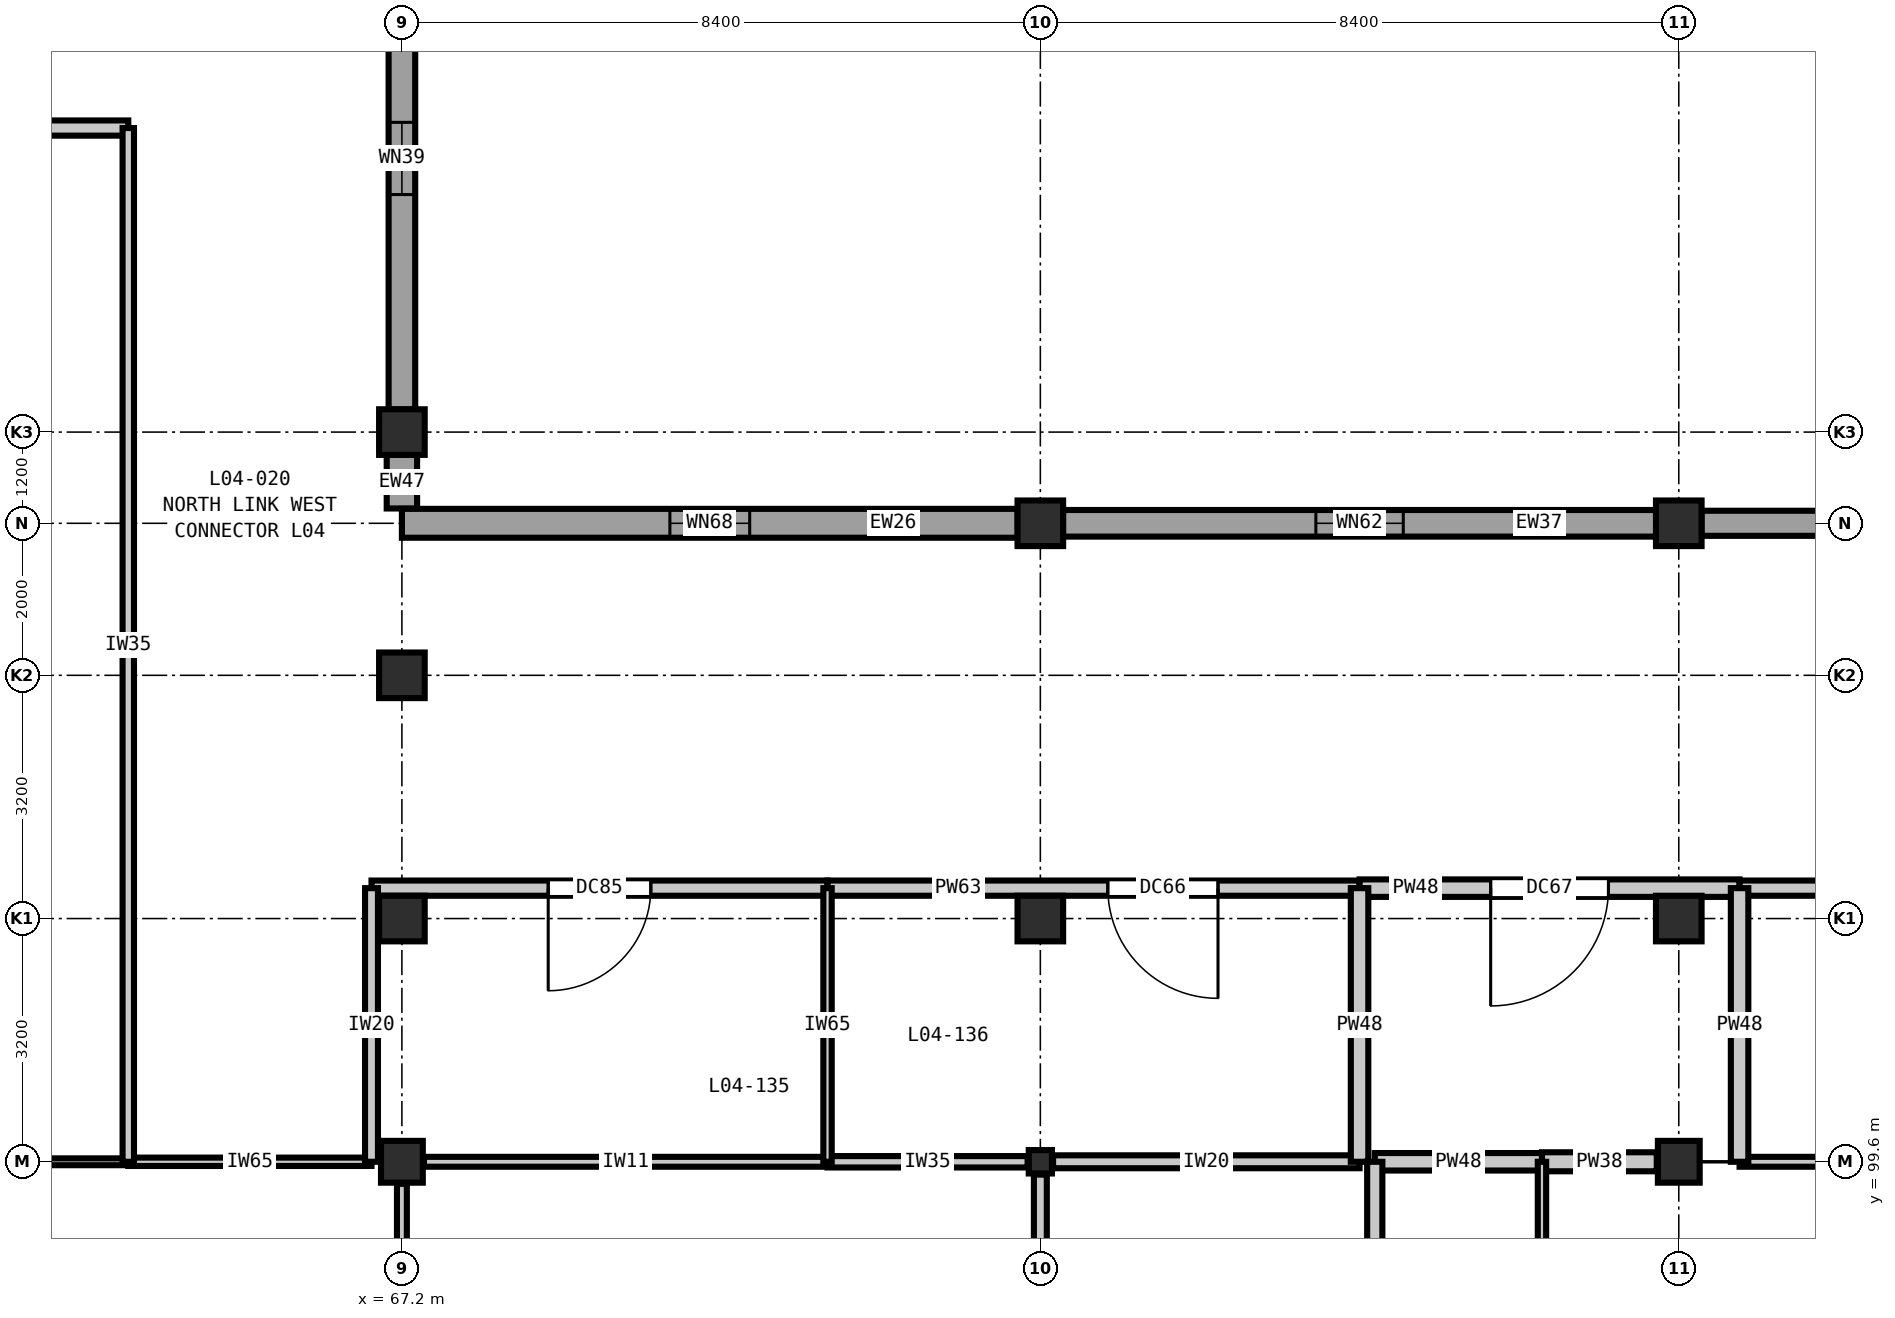
"""IFC4 building model, lengths in metres.
Left out: names, types, materials, properties, quantities, classifications, styles, units other than length and angle.
Written with IfcOpenShell. Run it as: python <this file> out.ifc"""

import sys

from ifc_helpers import new_model, si_unit, direction, frame, frame_2d, origin, origin_2d, place, context, subcontext, project, spatial, rectangle, i_section, extrude, element, fill, save


model = new_model("IFC4")
c1 = context("Model", 3, precision=1e-05, world=origin(), true_north=direction((0.0, 1.0)))
c2 = subcontext(c1, "Body", "Model", "MODEL_VIEW")
j1 = project(units=[si_unit("LENGTHUNIT", "METRE"), si_unit("PLANEANGLEUNIT", "RADIAN")], contexts=[c1])
p1 = place(None, origin())
s1 = spatial("IfcSite", under=j1, at=p1, CompositionType="ELEMENT")
p2 = place(p1, origin())
s2 = spatial("IfcBuilding", under=s1, at=p2, CompositionType="ELEMENT")
p3 = place(p2, frame((0.0, 0.0, 20.4)))
s3 = spatial("IfcBuildingStorey", under=s2, at=p3, CompositionType="ELEMENT", Elevation=20.4)
p4 = place(p3, frame((67.2, 99.6, 0.0), z_axis=(0.0, 0.0, 1.0), x_axis=(1.0, 0.0, 0.0)))
e1 = element("IfcColumn", 1, at=p4, inside=s3, PredefinedType="COLUMN", context=c2, shape_type="SweptSolid", body=[
    extrude(rectangle(XDim=0.55, YDim=0.55, at=origin_2d()), origin(), (0.0, 0.0, 1.0), 4.2),
])
for number, where, z_axis, x_axis in (
    (2, (67.2, 102.8, 0.0), (0.0, 0.0, 1.0), (1.0, 0.0, 0.0)),
    (3, (67.2, 106.0, 0.0), (0.0, 0.0, 1.0), (1.0, 0.0, 0.0)),
    (4, (67.2, 109.2, 0.0), (0.0, 0.0, 1.0), (1.0, 0.0, 0.0)),
):
    element("IfcColumn", number, at=place(p3, frame(where, z_axis=z_axis, x_axis=x_axis)), inside=s3, PredefinedType="COLUMN", context=c2, shape_type="SweptSolid", body=[
        extrude(rectangle(XDim=0.6, YDim=0.6, at=origin_2d()), origin(), (0.0, 0.0, 1.0), 4.2),
    ])
p5 = place(p3, frame((75.6, 99.6, 0.0), z_axis=(0.0, 0.0, 1.0), x_axis=(1.0, 0.0, 0.0)))
e5 = element("IfcColumn", 5, at=p5, inside=s3, PredefinedType="COLUMN", context=c2, shape_type="SweptSolid", body=[
    extrude(i_section(OverallWidth=0.305, OverallDepth=0.308, WebThickness=0.01, FlangeThickness=0.015, FilletRadius=0.015, at=origin_2d()), origin(), (0.0, 0.0, 1.0), 4.2),
])
for number, where, z_axis, x_axis in (
    (6, (75.6, 102.8, 0.0), (0.0, 0.0, 1.0), (1.0, 0.0, 0.0)),
    (7, (75.6, 108.0, 0.0), (0.0, 0.0, 1.0), (1.0, 0.0, 0.0)),
):
    element("IfcColumn", number, at=place(p3, frame(where, z_axis=z_axis, x_axis=x_axis)), inside=s3, PredefinedType="COLUMN", context=c2, shape_type="SweptSolid", body=[
        extrude(rectangle(XDim=0.6, YDim=0.6, at=origin_2d()), origin(), (0.0, 0.0, 1.0), 4.2),
    ])
p6 = place(p3, frame((84.0, 99.6, 0.0), z_axis=(0.0, 0.0, 1.0), x_axis=(1.0, 0.0, 0.0)))
e8 = element("IfcColumn", 8, at=p6, inside=s3, PredefinedType="COLUMN", context=c2, shape_type="SweptSolid", body=[
    extrude(rectangle(XDim=0.55, YDim=0.55, at=origin_2d()), origin(), (0.0, 0.0, 1.0), 4.2),
])
for number, where, z_axis, x_axis in (
    (9, (84.0, 102.8, 0.0), (0.0, 0.0, 1.0), (1.0, 0.0, 0.0)),
    (10, (84.0, 108.0, 0.0), (0.0, 0.0, 1.0), (1.0, 0.0, 0.0)),
):
    element("IfcColumn", number, at=place(p3, frame(where, z_axis=z_axis, x_axis=x_axis)), inside=s3, PredefinedType="COLUMN", context=c2, shape_type="SweptSolid", body=[
        extrude(rectangle(XDim=0.6, YDim=0.6, at=origin_2d()), origin(), (0.0, 0.0, 1.0), 4.2),
    ])
p7 = place(p3, frame((67.2, 116.102, 0.0), z_axis=(0.0, 0.0, 1.0), x_axis=(0.0, -1.0, 0.0)))
e11 = element("IfcWall", 11, at=p7, inside=s3, PredefinedType="SOLIDWALL", context=c2, shape_type="SweptSolid", body=[
    extrude(rectangle(XDim=6.604, YDim=0.35, at=frame_2d((3.302, 0.0))), origin(), (0.0, 0.0, 1.0), 3.48),
])
p8 = place(p7, frame((2.827, 0.0, 0.9)))
e12 = element("IfcOpeningElement", 12, at=p8, cuts=e11, PredefinedType="OPENING", context=c2, shape_type="SweptSolid", body=[
    extrude(rectangle(XDim=0.95, YDim=1.4, at=frame_2d((0.475, 0.7))), frame((0.0, 0.185, 0.0), z_axis=(0.0, -1.0, 0.0), x_axis=(1.0, 0.0, 0.0)), (0.0, 0.0, 1.0), 0.37),
])
p9 = place(p3, frame((67.2, 108.902, 0.0), z_axis=(0.0, 0.0, 1.0), x_axis=(0.0, -1.0, 0.0)))
e13 = element("IfcWall", 13, at=p9, inside=s3, PredefinedType="SOLIDWALL", context=c2, shape_type="SweptSolid", body=[
    extrude(rectangle(XDim=0.707, YDim=0.4, at=frame_2d((0.354, 0.0))), origin(), (0.0, 0.0, 1.0), 3.48),
])
p10 = place(p3, frame((67.2, 108.0, 0.0), z_axis=(0.0, 0.0, 1.0), x_axis=(1.0, 0.0, 0.0)))
e14 = element("IfcWall", 14, at=p10, inside=s3, PredefinedType="SOLIDWALL", context=c2, shape_type="SweptSolid", body=[
    extrude(rectangle(XDim=8.102, YDim=0.38, at=frame_2d((4.051, 0.0))), origin(), (0.0, 0.0, 1.0), 3.48),
])
p11 = place(p10, frame((3.526, 0.0, 0.9)))
e15 = element("IfcOpeningElement", 15, at=p11, cuts=e14, PredefinedType="OPENING", context=c2, shape_type="SweptSolid", body=[
    extrude(rectangle(XDim=1.05, YDim=1.4, at=frame_2d((0.525, 0.7))), frame((0.0, 0.2, 0.0), z_axis=(0.0, -1.0, 0.0), x_axis=(1.0, 0.0, 0.0)), (0.0, 0.0, 1.0), 0.4),
])
p12 = place(p3, frame((75.898, 108.0, 0.0), z_axis=(0.0, 0.0, 1.0), x_axis=(1.0, 0.0, 0.0)))
e16 = element("IfcWall", 16, at=p12, inside=s3, PredefinedType="SOLIDWALL", context=c2, shape_type="SweptSolid", body=[
    extrude(rectangle(XDim=7.804, YDim=0.35, at=frame_2d((3.902, 0.0))), origin(), (0.0, 0.0, 1.0), 3.48),
])
p13 = place(p12, frame((3.327, 0.0, 0.9)))
e17 = element("IfcOpeningElement", 17, at=p13, cuts=e16, PredefinedType="OPENING", context=c2, shape_type="SweptSolid", body=[
    extrude(rectangle(XDim=1.15, YDim=1.4, at=frame_2d((0.575, 0.7))), frame((0.0, 0.185, 0.0), z_axis=(0.0, -1.0, 0.0), x_axis=(1.0, 0.0, 0.0)), (0.0, 0.0, 1.0), 0.37),
])
p14 = place(p3, frame((84.298, 108.0, 0.0), z_axis=(0.0, 0.0, 1.0), x_axis=(1.0, 0.0, 0.0)))
e18 = element("IfcWall", 18, at=p14, inside=s3, PredefinedType="SOLIDWALL", context=c2, shape_type="SweptSolid", body=[
    extrude(rectangle(XDim=7.804, YDim=0.33, at=frame_2d((3.902, 0.0))), origin(), (0.0, 0.0, 1.0), 3.48),
])
p15 = place(p14, frame((3.277, 0.0, 0.9)))
e19 = element("IfcOpeningElement", 19, at=p15, cuts=e18, PredefinedType="OPENING", context=c2, shape_type="SweptSolid", body=[
    extrude(rectangle(XDim=1.25, YDim=1.4, at=frame_2d((0.625, 0.7))), frame((0.0, 0.175, 0.0), z_axis=(0.0, -1.0, 0.0), x_axis=(1.0, 0.0, 0.0)), (0.0, 0.0, 1.0), 0.35),
])
p16 = place(p3, frame((59.09, 99.6, 0.0), z_axis=(0.0, 0.0, 1.0), x_axis=(1.0, 0.0, 0.0)))
e20 = element("IfcWall", 20, at=p16, inside=s3, PredefinedType="PARTITIONING", context=c2, shape_type="SweptSolid", body=[
    extrude(rectangle(XDim=4.51, YDim=0.09, at=frame_2d((2.255, 0.0))), origin(), (0.0, 0.0, 1.0), 3.585),
])
p17 = place(p3, frame((63.6, 99.6, 0.0), z_axis=(0.0, 0.0, 1.0), x_axis=(1.0, 0.0, 0.0)))
e21 = element("IfcWall", 21, at=p17, inside=s3, PredefinedType="PARTITIONING", context=c2, shape_type="SweptSolid", body=[
    extrude(rectangle(XDim=3.2, YDim=0.11, at=frame_2d((1.6, 0.0))), origin(), (0.0, 0.0, 1.0), 3.585),
])
p18 = place(p3, frame((67.49, 99.6, 0.0), z_axis=(0.0, 0.0, 1.0), x_axis=(1.0, 0.0, 0.0)))
e22 = element("IfcWall", 22, at=p18, inside=s3, PredefinedType="PARTITIONING", context=c2, shape_type="SweptSolid", body=[
    extrude(rectangle(XDim=5.31, YDim=0.13, at=frame_2d((2.655, 0.0))), origin(), (0.0, 0.0, 1.0), 3.585),
])
p19 = place(p3, frame((72.8, 99.6, 0.0), z_axis=(0.0, 0.0, 1.0), x_axis=(1.0, 0.0, 0.0)))
e23 = element("IfcWall", 23, at=p19, inside=s3, PredefinedType="PARTITIONING", context=c2, shape_type="SweptSolid", body=[
    extrude(rectangle(XDim=2.633, YDim=0.15, at=frame_2d((1.316, 0.0))), origin(), (0.0, 0.0, 1.0), 3.585),
])
p20 = place(p3, frame((75.768, 99.6, 0.0), z_axis=(0.0, 0.0, 1.0), x_axis=(1.0, 0.0, 0.0)))
e24 = element("IfcWall", 24, at=p20, inside=s3, PredefinedType="PARTITIONING", context=c2, shape_type="SweptSolid", body=[
    extrude(rectangle(XDim=4.032, YDim=0.17, at=frame_2d((2.016, 0.0))), origin(), (0.0, 0.0, 1.0), 3.585),
])
p21 = place(p3, frame((80.0, 99.6, 0.0), z_axis=(0.0, 0.0, 1.0), x_axis=(1.0, 0.0, 0.0)))
e25 = element("IfcWall", 25, at=p21, inside=s3, PredefinedType="PARTITIONING", context=c2, shape_type="SweptSolid", body=[
    extrude(rectangle(XDim=2.2, YDim=0.23, at=frame_2d((1.1, 0.0))), origin(), (0.0, 0.0, 1.0), 3.585),
])
p22 = place(p3, frame((82.2, 99.6, 0.0), z_axis=(0.0, 0.0, 1.0), x_axis=(1.0, 0.0, 0.0)))
e26 = element("IfcWall", 26, at=p22, inside=s3, PredefinedType="PARTITIONING", context=c2, shape_type="SweptSolid", body=[
    extrude(rectangle(XDim=1.51, YDim=0.25, at=frame_2d((0.755, 0.0))), origin(), (0.0, 0.0, 1.0), 3.585),
])
p23 = place(p3, frame((84.8, 99.6, 0.0), z_axis=(0.0, 0.0, 1.0), x_axis=(1.0, 0.0, 0.0)))
e27 = element("IfcWall", 27, at=p23, inside=s3, PredefinedType="PARTITIONING", context=c2, shape_type="SweptSolid", body=[
    extrude(rectangle(XDim=5.8, YDim=0.13, at=frame_2d((2.9, 0.0))), origin(), (0.0, 0.0, 1.0), 3.585),
])
p24 = place(p3, frame((66.8, 103.2, 0.0), z_axis=(0.0, 0.0, 1.0), x_axis=(1.0, 0.0, 0.0)))
e28 = element("IfcWall", 28, at=p24, inside=s3, PredefinedType="PARTITIONING", context=c2, shape_type="SweptSolid", body=[
    extrude(rectangle(XDim=6.0, YDim=0.2, at=frame_2d((3.0, 0.0))), origin(), (0.0, 0.0, 1.0), 3.82),
])
p25 = place(p24, frame((2.325, 0.0, 0.0)))
e29 = element("IfcOpeningElement", 29, at=p25, cuts=e28, PredefinedType="OPENING", context=c2, shape_type="SweptSolid", body=[
    extrude(rectangle(XDim=1.35, YDim=2.2, at=frame_2d((0.675, 1.1))), frame((0.0, 0.11, 0.0), z_axis=(0.0, -1.0, 0.0), x_axis=(1.0, 0.0, 0.0)), (0.0, 0.0, 1.0), 0.22),
])
p26 = place(p3, frame((72.8, 103.2, 0.0), z_axis=(0.0, 0.0, 1.0), x_axis=(1.0, 0.0, 0.0)))
e30 = element("IfcWall", 30, at=p26, inside=s3, PredefinedType="PARTITIONING", context=c2, shape_type="SweptSolid", body=[
    extrude(rectangle(XDim=7.0, YDim=0.2, at=frame_2d((3.5, 0.0))), origin(), (0.0, 0.0, 1.0), 3.82),
])
p27 = place(p26, frame((3.688, 0.0, 0.0)))
e31 = element("IfcOpeningElement", 31, at=p27, cuts=e30, PredefinedType="OPENING", context=c2, shape_type="SweptSolid", body=[
    extrude(rectangle(XDim=1.45, YDim=2.25, at=frame_2d((0.725, 1.125))), frame((0.0, 0.11, 0.0), z_axis=(0.0, -1.0, 0.0), x_axis=(1.0, 0.0, 0.0)), (0.0, 0.0, 1.0), 0.22),
])
p28 = place(p3, frame((79.8, 103.2, 0.0), z_axis=(0.0, 0.0, 1.0), x_axis=(1.0, 0.0, 0.0)))
e32 = element("IfcWall", 32, at=p28, inside=s3, PredefinedType="PARTITIONING", context=c2, shape_type="SweptSolid", body=[
    extrude(rectangle(XDim=5.0, YDim=0.23, at=frame_2d((2.5, 0.0))), origin(), (0.0, 0.0, 1.0), 3.82),
])
p29 = place(p28, frame((1.725, 0.0, 0.0)))
e33 = element("IfcOpeningElement", 33, at=p29, cuts=e32, PredefinedType="OPENING", context=c2, shape_type="SweptSolid", body=[
    extrude(rectangle(XDim=1.55, YDim=2.25, at=frame_2d((0.775, 1.125))), frame((0.0, 0.125, 0.0), z_axis=(0.0, -1.0, 0.0), x_axis=(1.0, 0.0, 0.0)), (0.0, 0.0, 1.0), 0.25),
])
p30 = place(p3, frame((84.8, 103.2, 0.0), z_axis=(0.0, 0.0, 1.0), x_axis=(1.0, 0.0, 0.0)))
e34 = element("IfcWall", 34, at=p30, inside=s3, PredefinedType="PARTITIONING", context=c2, shape_type="SweptSolid", body=[
    extrude(rectangle(XDim=6.0, YDim=0.2, at=frame_2d((3.0, 0.0))), origin(), (0.0, 0.0, 1.0), 3.82),
])
p31 = place(p30, frame((2.15, 0.0, 0.0)))
e35 = element("IfcOpeningElement", 35, at=p31, cuts=e34, PredefinedType="OPENING", context=c2, shape_type="SweptSolid", body=[
    extrude(rectangle(XDim=1.7, YDim=2.3, at=frame_2d((0.85, 1.15))), frame((0.0, 0.11, 0.0), z_axis=(0.0, -1.0, 0.0), x_axis=(1.0, 0.0, 0.0)), (0.0, 0.0, 1.0), 0.22),
])
p32 = place(p3, frame((58.2, 113.2, 0.0), z_axis=(0.0, 0.0, 1.0), x_axis=(1.0, 0.0, 0.0)))
e36 = element("IfcWall", 36, at=p32, inside=s3, PredefinedType="PARTITIONING", context=c2, shape_type="SweptSolid", body=[
    extrude(rectangle(XDim=5.4, YDim=0.2, at=frame_2d((2.7, 0.0))), origin(), (0.0, 0.0, 1.0), 3.82),
])
p33 = place(p32, frame((1.925, 0.0, 0.0)))
e37 = element("IfcOpeningElement", 37, at=p33, cuts=e36, PredefinedType="OPENING", context=c2, shape_type="SweptSolid", body=[
    extrude(rectangle(XDim=1.55, YDim=2.25, at=frame_2d((0.775, 1.125))), frame((0.0, 0.11, 0.0), z_axis=(0.0, -1.0, 0.0), x_axis=(1.0, 0.0, 0.0)), (0.0, 0.0, 1.0), 0.22),
])
p34 = place(p3, frame((63.6, 99.6, 0.0), z_axis=(0.0, 0.0, 1.0), x_axis=(0.0, 1.0, 0.0)))
e38 = element("IfcWall", 38, at=p34, inside=s3, PredefinedType="PARTITIONING", context=c2, shape_type="SweptSolid", body=[
    extrude(rectangle(XDim=13.6, YDim=0.15, at=frame_2d((6.8, 0.0))), origin(), (0.0, 0.0, 1.0), 3.82),
])
p35 = place(p3, frame((66.8, 99.6, 0.0), z_axis=(0.0, 0.0, 1.0), x_axis=(0.0, 1.0, 0.0)))
e39 = element("IfcWall", 39, at=p35, inside=s3, PredefinedType="PARTITIONING", context=c2, shape_type="SweptSolid", body=[
    extrude(rectangle(XDim=3.6, YDim=0.17, at=frame_2d((1.8, 0.0))), origin(), (0.0, 0.0, 1.0), 3.82),
])
p36 = place(p3, frame((67.2, 91.49, 0.0), z_axis=(0.0, 0.0, 1.0), x_axis=(0.0, 1.0, 0.0)))
e40 = element("IfcWall", 40, at=p36, inside=s3, PredefinedType="PARTITIONING", context=c2, shape_type="SweptSolid", body=[
    extrude(rectangle(XDim=7.82, YDim=0.13, at=frame_2d((3.91, 0.0))), origin(), (0.0, 0.0, 1.0), 3.585),
])
p37 = place(p3, frame((72.8, 99.6, 0.0), z_axis=(0.0, 0.0, 1.0), x_axis=(0.0, 1.0, 0.0)))
e41 = element("IfcWall", 41, at=p37, inside=s3, PredefinedType="PARTITIONING", context=c2, shape_type="SweptSolid", body=[
    extrude(rectangle(XDim=3.6, YDim=0.11, at=frame_2d((1.8, 0.0))), origin(), (0.0, 0.0, 1.0), 3.82),
])
p38 = place(p3, frame((75.6, 91.369, 0.0), z_axis=(0.0, 0.0, 1.0), x_axis=(0.0, 1.0, 0.0)))
e42 = element("IfcWall", 42, at=p38, inside=s3, PredefinedType="PARTITIONING", context=c2, shape_type="SweptSolid", body=[
    extrude(rectangle(XDim=8.062, YDim=0.17, at=frame_2d((4.031, 0.0))), origin(), (0.0, 0.0, 1.0), 3.412),
])
p39 = place(p3, frame((79.8, 99.6, 0.0), z_axis=(0.0, 0.0, 1.0), x_axis=(0.0, 1.0, 0.0)))
e43 = element("IfcWall", 43, at=p39, inside=s3, PredefinedType="PARTITIONING", context=c2, shape_type="SweptSolid", body=[
    extrude(rectangle(XDim=3.6, YDim=0.23, at=frame_2d((1.8, 0.0))), origin(), (0.0, 0.0, 1.0), 3.82),
])
p40 = place(p3, frame((80.0, 94.1, 0.0), z_axis=(0.0, 0.0, 1.0), x_axis=(0.0, 1.0, 0.0)))
e44 = element("IfcWall", 44, at=p40, inside=s3, PredefinedType="PARTITIONING", context=c2, shape_type="SweptSolid", body=[
    extrude(rectangle(XDim=5.5, YDim=0.2, at=frame_2d((2.75, 0.0))), origin(), (0.0, 0.0, 1.0), 3.82),
])
p41 = place(p40, frame((2.025, 0.0, 0.0)))
e45 = element("IfcOpeningElement", 45, at=p41, cuts=e44, PredefinedType="OPENING", context=c2, shape_type="SweptSolid", body=[
    extrude(rectangle(XDim=1.45, YDim=2.25, at=frame_2d((0.725, 1.125))), frame((0.0, 0.11, 0.0), z_axis=(0.0, -1.0, 0.0), x_axis=(1.0, 0.0, 0.0)), (0.0, 0.0, 1.0), 0.22),
])
p42 = place(p3, frame((82.2, 94.1, 0.0), z_axis=(0.0, 0.0, 1.0), x_axis=(0.0, 1.0, 0.0)))
e46 = element("IfcWall", 46, at=p42, inside=s3, PredefinedType="PARTITIONING", context=c2, shape_type="SweptSolid", body=[
    extrude(rectangle(XDim=5.5, YDim=0.11, at=frame_2d((2.75, 0.0))), origin(), (0.0, 0.0, 1.0), 3.82),
])
p43 = place(p3, frame((84.8, 99.6, 0.0), z_axis=(0.0, 0.0, 1.0), x_axis=(0.0, 1.0, 0.0)))
e47 = element("IfcWall", 47, at=p43, inside=s3, PredefinedType="PARTITIONING", context=c2, shape_type="SweptSolid", body=[
    extrude(rectangle(XDim=3.6, YDim=0.23, at=frame_2d((1.8, 0.0))), origin(), (0.0, 0.0, 1.0), 3.82),
])
p44 = place(p8, origin())
e48 = element("IfcWindow", 48, at=p44, inside=s3, PartitioningType="SINGLE_PANEL", PredefinedType="WINDOW", context=c2, shape_type="SweptSolid", body=[
    extrude(rectangle(XDim=0.95, YDim=1.4, at=frame_2d((0.475, 0.7))), frame((0.0, 0.03, 0.0), z_axis=(0.0, -1.0, 0.0), x_axis=(1.0, 0.0, 0.0)), (0.0, 0.0, 1.0), 0.06),
])
fill(e12, e48)
p45 = place(p11, origin())
e49 = element("IfcWindow", 49, at=p45, inside=s3, PartitioningType="SINGLE_PANEL", PredefinedType="WINDOW", context=c2, shape_type="SweptSolid", body=[
    extrude(rectangle(XDim=1.05, YDim=1.4, at=frame_2d((0.525, 0.7))), frame((0.0, 0.03, 0.0), z_axis=(0.0, -1.0, 0.0), x_axis=(1.0, 0.0, 0.0)), (0.0, 0.0, 1.0), 0.06),
])
fill(e15, e49)
p46 = place(p13, origin())
e50 = element("IfcWindow", 50, at=p46, inside=s3, PartitioningType="SINGLE_PANEL", PredefinedType="WINDOW", context=c2, shape_type="SweptSolid", body=[
    extrude(rectangle(XDim=1.15, YDim=1.4, at=frame_2d((0.575, 0.7))), frame((0.0, 0.03, 0.0), z_axis=(0.0, -1.0, 0.0), x_axis=(1.0, 0.0, 0.0)), (0.0, 0.0, 1.0), 0.06),
])
fill(e17, e50)
p47 = place(p25, frame((1.35, 0.0, 0.0), z_axis=(0.0, 0.0, 1.0), x_axis=(-1.0, 0.0, 0.0)))
e51 = element("IfcDoor", 51, at=p47, inside=s3, OperationType="SINGLE_SWING_RIGHT", PredefinedType="DOOR", context=c2, shape_type="SweptSolid", body=[
    extrude(rectangle(XDim=1.35, YDim=2.2, at=frame_2d((0.675, 1.1))), frame((0.0, 0.025, 0.0), z_axis=(0.0, -1.0, 0.0), x_axis=(1.0, 0.0, 0.0)), (0.0, 0.0, 1.0), 0.05),
])
fill(e29, e51)
p48 = place(p27, frame((1.45, 0.0, 0.0), z_axis=(0.0, 0.0, 1.0), x_axis=(-1.0, 0.0, 0.0)))
e52 = element("IfcDoor", 52, at=p48, inside=s3, OperationType="SINGLE_SWING_LEFT", PredefinedType="DOOR", context=c2, shape_type="SweptSolid", body=[
    extrude(rectangle(XDim=1.45, YDim=2.25, at=frame_2d((0.725, 1.125))), frame((0.0, 0.025, 0.0), z_axis=(0.0, -1.0, 0.0), x_axis=(1.0, 0.0, 0.0)), (0.0, 0.0, 1.0), 0.05),
])
fill(e31, e52)
p49 = place(p29, frame((1.55, 0.0, 0.0), z_axis=(0.0, 0.0, 1.0), x_axis=(-1.0, 0.0, 0.0)))
e53 = element("IfcDoor", 53, at=p49, inside=s3, OperationType="SINGLE_SWING_RIGHT", PredefinedType="DOOR", context=c2, shape_type="SweptSolid", body=[
    extrude(rectangle(XDim=1.55, YDim=2.25, at=frame_2d((0.775, 1.125))), frame((0.0, 0.025, 0.0), z_axis=(0.0, -1.0, 0.0), x_axis=(1.0, 0.0, 0.0)), (0.0, 0.0, 1.0), 0.05),
])
fill(e33, e53)
save(model, sys.argv[1])
